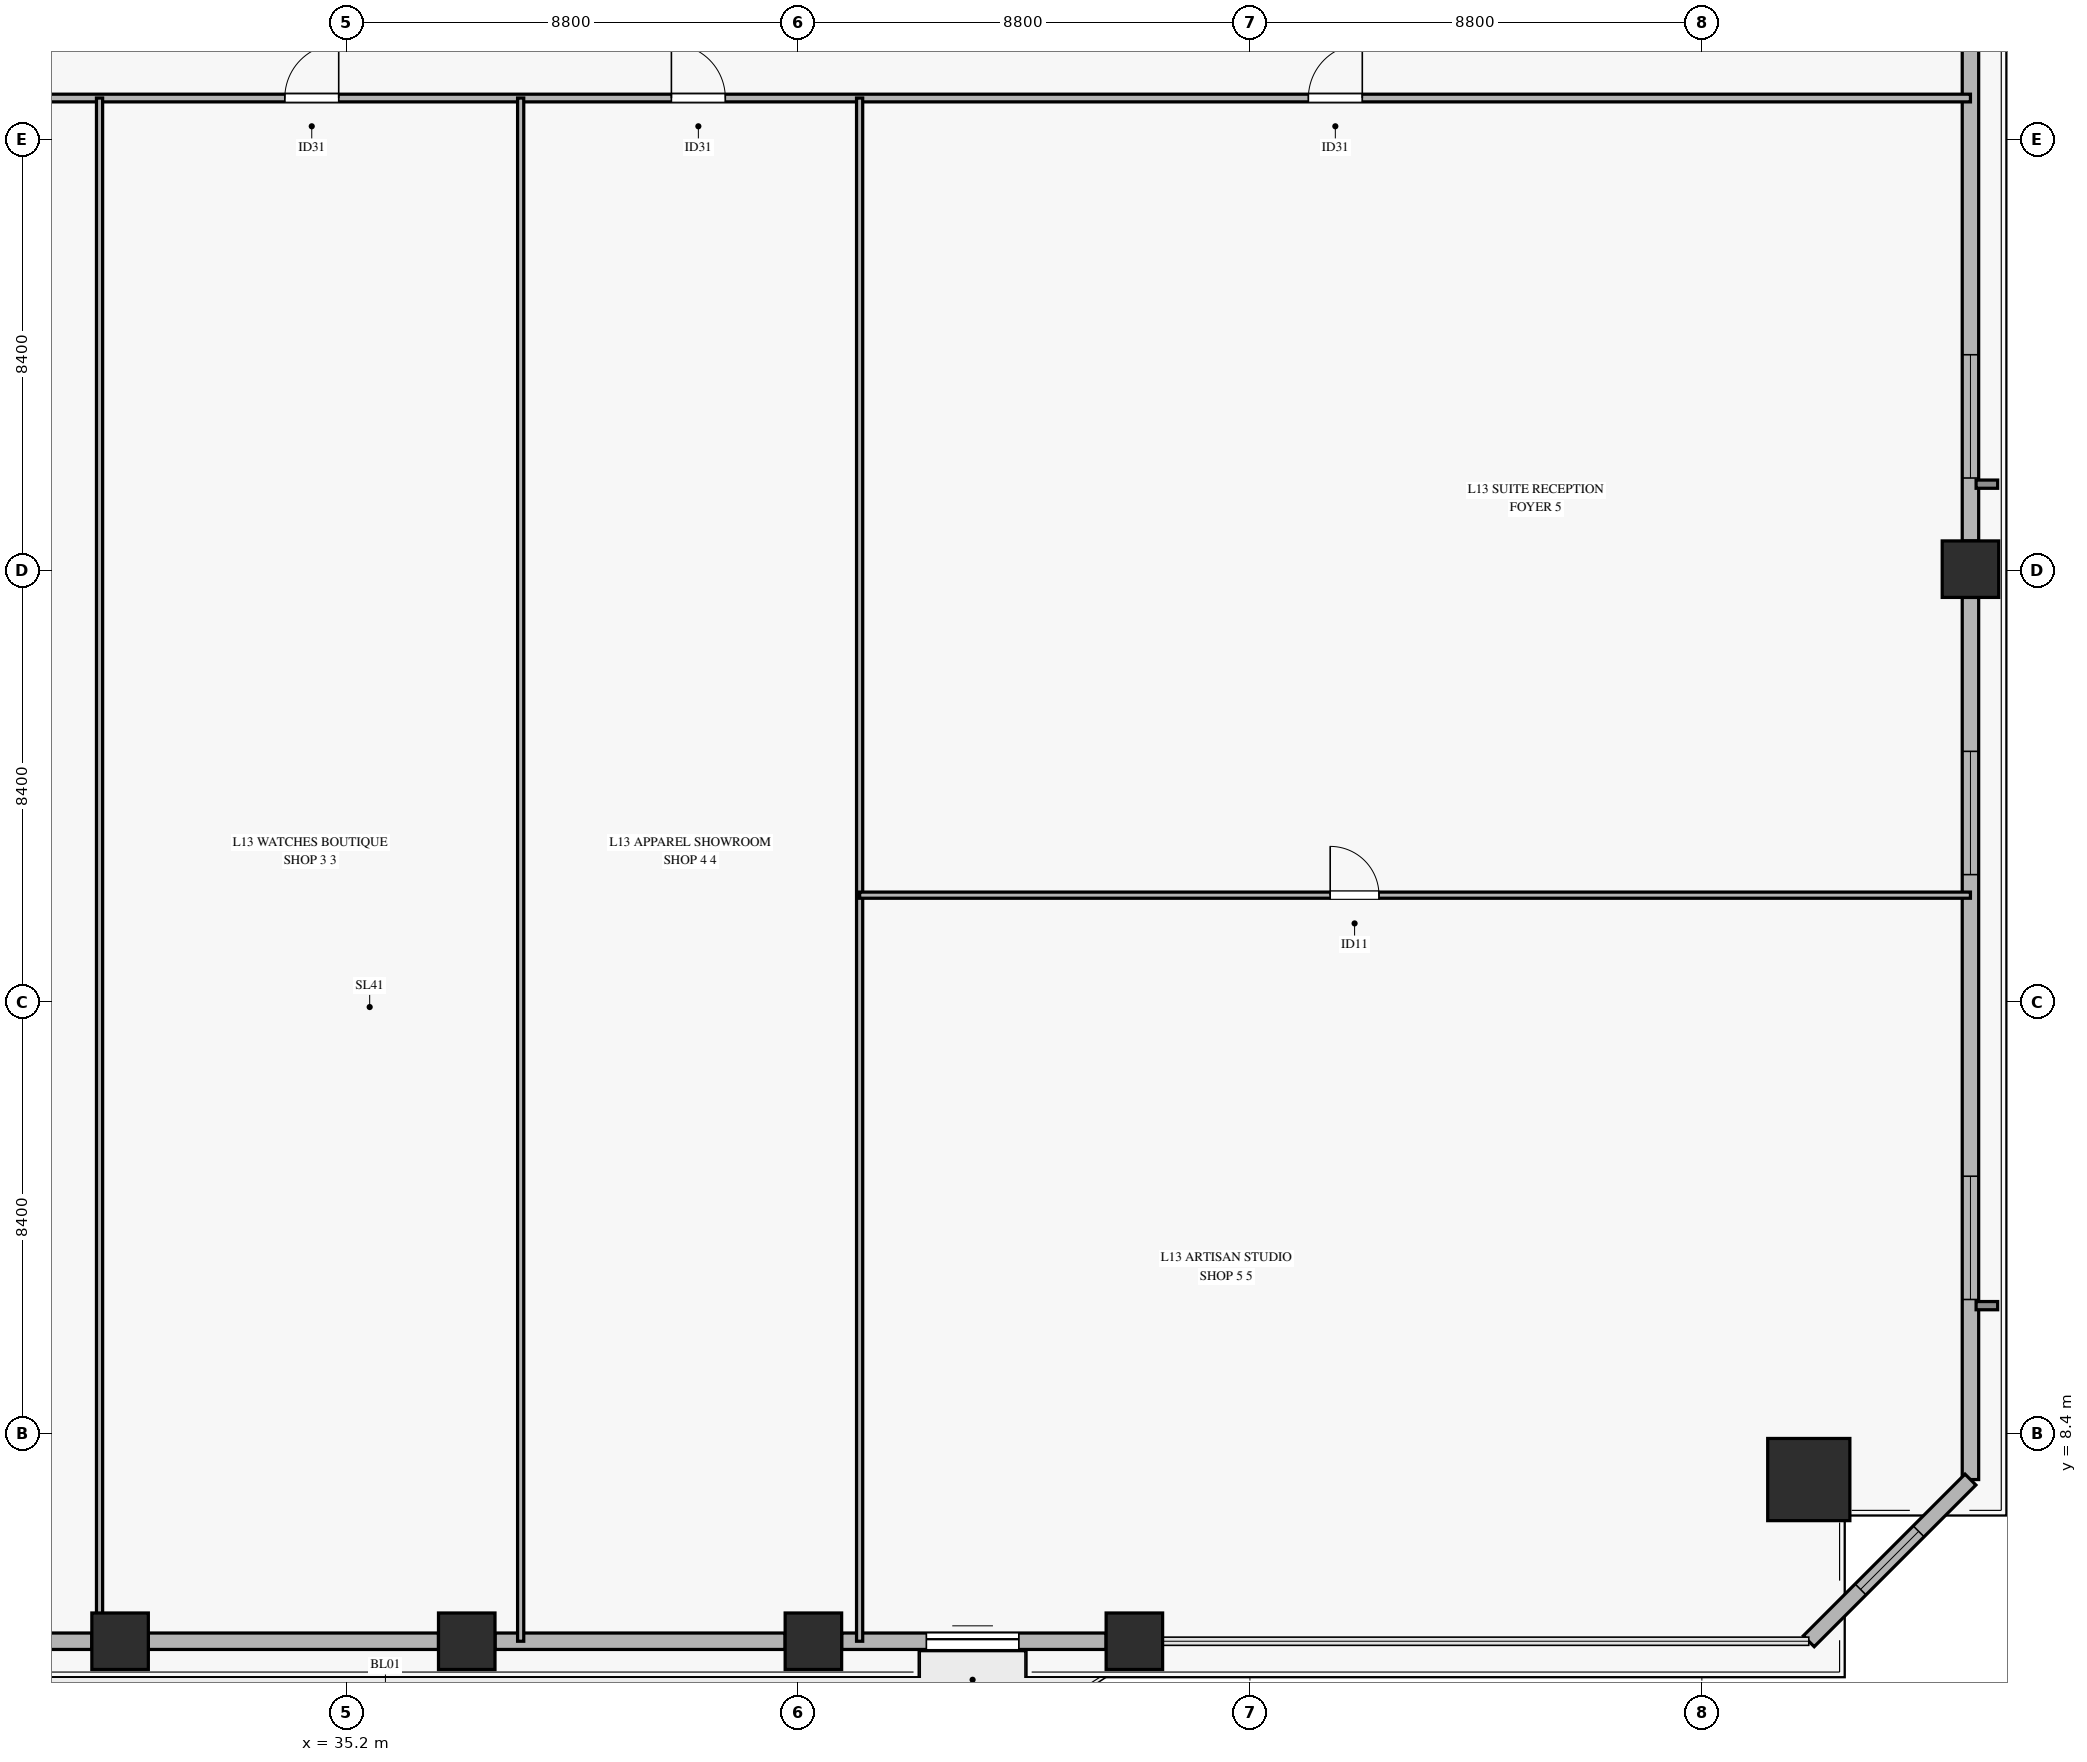
"""IFC4 building model, lengths in metres.
Left out: names, types, materials, properties, quantities, classifications, styles, units other than length and angle.
Written with IfcOpenShell. Run it as: python <this file> out.ifc"""

import sys

from ifc_helpers import new_model, si_unit, direction, frame, frame_2d, origin, origin_2d, place, context, subcontext, project, spatial, rectangle, hollow_rectangle, extrude, source, transform, mapped, element, fill, save


model = new_model("IFC4")
c1 = context("Model", 3, precision=1e-05, world=origin(), true_north=direction((0.0, 1.0)))
c2 = subcontext(c1, "Body", "Model", "MODEL_VIEW")
j1 = project(units=[si_unit("LENGTHUNIT", "METRE"), si_unit("PLANEANGLEUNIT", "RADIAN")], contexts=[c1])
p1 = place(None, origin())
s1 = spatial("IfcSite", under=j1, at=p1, CompositionType="ELEMENT")
p2 = place(p1, origin())
s2 = spatial("IfcBuilding", under=s1, at=p2, CompositionType="ELEMENT")
p3 = place(p2, frame((0.0, 0.0, 53.3)))
s3 = spatial("IfcBuildingStorey", under=s2, at=p3, CompositionType="ELEMENT", Elevation=53.3)
m1 = source(origin(), c2, "Body", "SweptSolid", [
    extrude(hollow_rectangle(XDim=1.6, YDim=1.6, WallThickness=0.075, at=origin_2d()), origin(), (0.0, 0.0, 1.0), 3.68),
])
p4 = place(p3, frame((63.682, 7.502, 0.0), z_axis=(0.0, 0.0, 1.0), x_axis=(1.0, 0.0, 0.0)))
e1 = element("IfcColumn", 1, at=p4, inside=s3, PredefinedType="COLUMN", context=c2, shape_type="MappedRepresentation", body=[
    mapped(m1, transform((0.0, 0.0, 0.0), x_axis=(1.0, 0.0, 0.0), y_axis=(0.0, 1.0, 0.0), z_axis=(0.0, 0.0, 1.0), scale=1.0)),
])
m2 = source(origin(), c2, "Body", "SweptSolid", [
    extrude(hollow_rectangle(XDim=1.1, YDim=1.1, WallThickness=0.05, at=origin_2d()), origin(), (0.0, 0.0, 1.0), 3.68),
])
for number, where, z_axis, x_axis in (
    (2, (30.8, 4.354, 0.0), (0.0, 0.0, 1.0), (1.0, 0.0, 0.0)),
    (3, (37.55, 4.354, 0.0), (0.0, 0.0, 1.0), (1.0, 0.0, 0.0)),
    (4, (44.3, 4.354, 0.0), (0.0, 0.0, 1.0), (1.0, 0.0, 0.0)),
    (5, (50.55, 4.354, 0.0), (0.0, 0.0, 1.0), (1.0, 0.0, 0.0)),
    (6, (66.83, 25.227, 0.0), (0.0, 0.0, 1.0), (1.0, 0.0, 0.0)),
):
    element("IfcColumn", number, at=place(p3, frame(where, z_axis=z_axis, x_axis=x_axis)), inside=s3, PredefinedType="COLUMN", context=c2, shape_type="MappedRepresentation", body=[
        mapped(m2, transform((0.0, 0.0, 0.0), x_axis=(1.0, 0.0, 0.0), y_axis=(0.0, 1.0, 0.0), z_axis=(0.0, 0.0, 1.0), scale=1.0)),
    ])
p5 = place(p3, frame((20.4, 4.354, 0.0), z_axis=(0.0, 0.0, 1.0), x_axis=(1.0, 0.0, 0.0)))
e7 = element("IfcWall", 7, at=p5, inside=s3, PredefinedType="SOLIDWALL", context=c2, shape_type="SweptSolid", body=[
    extrude(rectangle(XDim=9.85, YDim=0.32, at=frame_2d((4.925, 0.0))), origin(), (0.0, 0.0, 1.0), 3.16),
])
p6 = place(p5, frame((4.0, 0.0, 0.0)))
e8 = element("IfcOpeningElement", 8, at=p6, cuts=e7, PredefinedType="OPENING", context=c2, shape_type="SweptSolid", body=[
    extrude(rectangle(XDim=1.8, YDim=2.25, at=frame_2d((0.9, 1.125))), frame((0.0, 0.17, 0.0), z_axis=(0.0, -1.0, 0.0), x_axis=(1.0, 0.0, 0.0)), (0.0, 0.0, 1.0), 0.34),
])
p7 = place(p5, frame((2.045, 0.0, 0.45)))
e9 = element("IfcOpeningElement", 9, at=p7, cuts=e7, PredefinedType="OPENING", context=c2, shape_type="SweptSolid", body=[
    extrude(rectangle(XDim=1.6, YDim=2.0, at=frame_2d((0.8, 1.0))), frame((0.0, 0.17, 0.0), z_axis=(0.0, -1.0, 0.0), x_axis=(1.0, 0.0, 0.0)), (0.0, 0.0, 1.0), 0.34),
])
p8 = place(p5, frame((7.35, 0.0, 0.45)))
e10 = element("IfcOpeningElement", 10, at=p8, cuts=e7, PredefinedType="OPENING", context=c2, shape_type="SweptSolid", body=[
    extrude(rectangle(XDim=1.6, YDim=2.0, at=frame_2d((0.8, 1.0))), frame((0.0, 0.17, 0.0), z_axis=(0.0, -1.0, 0.0), x_axis=(1.0, 0.0, 0.0)), (0.0, 0.0, 1.0), 0.34),
])
for number, where, z_axis, x_axis in (
    (11, (31.35, 4.354, 0.0), (0.0, 0.0, 1.0), (1.0, 0.0, 0.0)),
    (12, (38.1, 4.354, 0.0), (0.0, 0.0, 1.0), (1.0, 0.0, 0.0)),
):
    element("IfcWall", number, at=place(p3, frame(where, z_axis=z_axis, x_axis=x_axis)), inside=s3, PredefinedType="SOLIDWALL", context=c2, shape_type="SweptSolid", body=[
        extrude(rectangle(XDim=5.65, YDim=0.32, at=frame_2d((2.825, 0.0))), origin(), (0.0, 0.0, 1.0), 3.16),
    ])
p9 = place(p3, frame((44.85, 4.354, 0.0), z_axis=(0.0, 0.0, 1.0), x_axis=(1.0, 0.0, 0.0)))
e13 = element("IfcWall", 13, at=p9, inside=s3, PredefinedType="SOLIDWALL", context=c2, shape_type="SweptSolid", body=[
    extrude(rectangle(XDim=5.15, YDim=0.32, at=frame_2d((2.575, 0.0))), origin(), (0.0, 0.0, 1.0), 3.16),
])
p10 = place(p9, frame((1.65, 0.0, 0.0)))
e14 = element("IfcOpeningElement", 14, at=p10, cuts=e13, PredefinedType="OPENING", context=c2, shape_type="SweptSolid", body=[
    extrude(rectangle(XDim=1.8, YDim=2.25, at=frame_2d((0.9, 1.125))), frame((0.0, 0.17, 0.0), z_axis=(0.0, -1.0, 0.0), x_axis=(1.0, 0.0, 0.0)), (0.0, 0.0, 1.0), 0.34),
])
p11 = place(p3, frame((66.83, 7.502, 0.0), z_axis=(0.0, 0.0, 1.0), x_axis=(0.0, 1.0, 0.0)))
e15 = element("IfcWall", 15, at=p11, inside=s3, PredefinedType="SOLIDWALL", context=c2, shape_type="SweptSolid", body=[
    extrude(rectangle(XDim=17.175, YDim=0.32, at=frame_2d((8.587, 0.0))), origin(), (0.0, 0.0, 1.0), 3.16),
])
p12 = place(p11, frame((3.506, 0.0, 0.45)))
e16 = element("IfcOpeningElement", 16, at=p12, cuts=e15, PredefinedType="OPENING", context=c2, shape_type="SweptSolid", body=[
    extrude(rectangle(XDim=2.4, YDim=2.1, at=frame_2d((1.2, 1.05))), frame((0.0, 0.17, 0.0), z_axis=(0.0, -1.0, 0.0), x_axis=(1.0, 0.0, 0.0)), (0.0, 0.0, 1.0), 0.34),
])
p13 = place(p11, frame((11.778, 0.0, 0.45)))
e17 = element("IfcOpeningElement", 17, at=p13, cuts=e15, PredefinedType="OPENING", context=c2, shape_type="SweptSolid", body=[
    extrude(rectangle(XDim=2.4, YDim=2.1, at=frame_2d((1.2, 1.05))), frame((0.0, 0.17, 0.0), z_axis=(0.0, -1.0, 0.0), x_axis=(1.0, 0.0, 0.0)), (0.0, 0.0, 1.0), 0.34),
])
p14 = place(p3, frame((66.83, 25.777, 0.0), z_axis=(0.0, 0.0, 1.0), x_axis=(0.0, 1.0, 0.0)))
e18 = element("IfcWall", 18, at=p14, inside=s3, PredefinedType="SOLIDWALL", context=c2, shape_type="SweptSolid", body=[
    extrude(rectangle(XDim=17.175, YDim=0.32, at=frame_2d((8.587, 0.0))), origin(), (0.0, 0.0, 1.0), 3.16),
])
p15 = place(p14, frame((1.225, 0.0, 0.45)))
e19 = element("IfcOpeningElement", 19, at=p15, cuts=e18, PredefinedType="OPENING", context=c2, shape_type="SweptSolid", body=[
    extrude(rectangle(XDim=2.4, YDim=2.1, at=frame_2d((1.2, 1.05))), frame((0.0, 0.17, 0.0), z_axis=(0.0, -1.0, 0.0), x_axis=(1.0, 0.0, 0.0)), (0.0, 0.0, 1.0), 0.34),
])
p16 = place(p14, frame((12.981, 0.0, 0.45)))
e20 = element("IfcOpeningElement", 20, at=p16, cuts=e18, PredefinedType="OPENING", context=c2, shape_type="SweptSolid", body=[
    extrude(rectangle(XDim=2.4, YDim=2.1, at=frame_2d((1.2, 1.05))), frame((0.0, 0.17, 0.0), z_axis=(0.0, -1.0, 0.0), x_axis=(1.0, 0.0, 0.0)), (0.0, 0.0, 1.0), 0.34),
])
p17 = place(p3, frame((63.682, 4.354, 0.0), z_axis=(0.0, 0.0, 1.0), x_axis=(0.707134199585, 0.707079361725, 0.0)))
e21 = element("IfcWall", 21, at=p17, inside=s3, PredefinedType="SOLIDWALL", context=c2, shape_type="SweptSolid", body=[
    extrude(rectangle(XDim=4.452, YDim=0.3, at=frame_2d((2.226, 0.0))), origin(), (0.0, 0.0, 1.0), 3.16),
])
p18 = place(p17, frame((1.426, 0.0, 0.45)))
e22 = element("IfcOpeningElement", 22, at=p18, cuts=e21, PredefinedType="OPENING", context=c2, shape_type="SweptSolid", body=[
    extrude(rectangle(XDim=1.6, YDim=2.0, at=frame_2d((0.8, 1.0))), frame((0.0, 0.16, 0.0), z_axis=(0.0, -1.0, 0.0), x_axis=(1.0, 0.0, 0.0)), (0.0, 0.0, 1.0), 0.32),
])
p19 = place(p3, frame((3.57, 34.4, 0.0), z_axis=(0.0, 0.0, 1.0), x_axis=(1.0, 0.0, 0.0)))
e23 = element("IfcWall", 23, at=p19, inside=s3, PredefinedType="PARTITIONING", context=c2, shape_type="SweptSolid", body=[
    extrude(rectangle(XDim=63.26, YDim=0.15, at=frame_2d((31.63, 0.0))), origin(), (0.0, 0.0, 1.0), 2.765),
])
p20 = place(p19, frame((7.658, 0.0, 0.0)))
e24 = element("IfcOpeningElement", 24, at=p20, cuts=e23, PredefinedType="OPENING", context=c2, shape_type="SweptSolid", body=[
    extrude(rectangle(XDim=1.05, YDim=2.15, at=frame_2d((0.525, 1.075))), frame((0.0, 0.085, 0.0), z_axis=(0.0, -1.0, 0.0), x_axis=(1.0, 0.0, 0.0)), (0.0, 0.0, 1.0), 0.17),
])
p21 = place(p19, frame((22.121, 0.0, 0.0)))
e25 = element("IfcOpeningElement", 25, at=p21, cuts=e23, PredefinedType="OPENING", context=c2, shape_type="SweptSolid", body=[
    extrude(rectangle(XDim=1.05, YDim=2.15, at=frame_2d((0.525, 1.075))), frame((0.0, 0.085, 0.0), z_axis=(0.0, -1.0, 0.0), x_axis=(1.0, 0.0, 0.0)), (0.0, 0.0, 1.0), 0.17),
])
p22 = place(p19, frame((30.437, 0.0, 0.0)))
e26 = element("IfcOpeningElement", 26, at=p22, cuts=e23, PredefinedType="OPENING", context=c2, shape_type="SweptSolid", body=[
    extrude(rectangle(XDim=1.05, YDim=2.15, at=frame_2d((0.525, 1.075))), frame((0.0, 0.085, 0.0), z_axis=(0.0, -1.0, 0.0), x_axis=(1.0, 0.0, 0.0)), (0.0, 0.0, 1.0), 0.17),
])
p23 = place(p19, frame((37.965, 0.0, 0.0)))
e27 = element("IfcOpeningElement", 27, at=p23, cuts=e23, PredefinedType="OPENING", context=c2, shape_type="SweptSolid", body=[
    extrude(rectangle(XDim=1.05, YDim=2.15, at=frame_2d((0.525, 1.075))), frame((0.0, 0.085, 0.0), z_axis=(0.0, -1.0, 0.0), x_axis=(1.0, 0.0, 0.0)), (0.0, 0.0, 1.0), 0.17),
])
p24 = place(p19, frame((50.368, 0.0, 0.0)))
e28 = element("IfcOpeningElement", 28, at=p24, cuts=e23, PredefinedType="OPENING", context=c2, shape_type="SweptSolid", body=[
    extrude(rectangle(XDim=1.05, YDim=2.15, at=frame_2d((0.525, 1.075))), frame((0.0, 0.085, 0.0), z_axis=(0.0, -1.0, 0.0), x_axis=(1.0, 0.0, 0.0)), (0.0, 0.0, 1.0), 0.17),
])
p25 = place(p3, frame((30.4, 4.354, 0.0), z_axis=(0.0, 0.0, 1.0), x_axis=(0.0, 1.0, 0.0)))
e29 = element("IfcWall", 29, at=p25, inside=s3, PredefinedType="PARTITIONING", context=c2, shape_type="SweptSolid", body=[
    extrude(rectangle(XDim=30.046, YDim=0.12, at=frame_2d((15.023, 0.0))), origin(), (0.0, 0.0, 1.0), 3.215),
])
for number, where, z_axis, x_axis in (
    (30, (38.6, 4.354, 0.0), (0.0, 0.0, 1.0), (0.0, 1.0, 0.0)),
    (31, (45.2, 4.354, 0.0), (0.0, 0.0, 1.0), (0.0, 1.0, 0.0)),
):
    element("IfcWall", number, at=place(p3, frame(where, z_axis=z_axis, x_axis=x_axis)), inside=s3, PredefinedType="PARTITIONING", context=c2, shape_type="SweptSolid", body=[
        extrude(rectangle(XDim=30.046, YDim=0.12, at=frame_2d((15.023, 0.0))), origin(), (0.0, 0.0, 1.0), 3.165),
    ])
p26 = place(p3, frame((45.2, 18.88, 0.0), z_axis=(0.0, 0.0, 1.0), x_axis=(1.0, 0.0, 0.0)))
e32 = element("IfcWall", 32, at=p26, inside=s3, PredefinedType="PARTITIONING", context=c2, shape_type="SweptSolid", body=[
    extrude(rectangle(XDim=21.63, YDim=0.12, at=frame_2d((10.815, 0.0))), origin(), (0.0, 0.0, 1.0), 2.765),
])
p27 = place(p26, frame((9.163, 0.0, 0.0)))
e33 = element("IfcOpeningElement", 33, at=p27, cuts=e32, PredefinedType="OPENING", context=c2, shape_type="SweptSolid", body=[
    extrude(rectangle(XDim=0.95, YDim=2.1, at=frame_2d((0.475, 1.05))), frame((0.0, 0.07, 0.0), z_axis=(0.0, -1.0, 0.0), x_axis=(1.0, 0.0, 0.0)), (0.0, 0.0, 1.0), 0.14),
])
m3 = source(origin(), c2, "Body", "SweptSolid", [
    extrude(rectangle(XDim=1.8, YDim=2.25, at=frame_2d((0.9, 1.125))), frame((0.0, 0.025, 0.0), z_axis=(0.0, -1.0, 0.0), x_axis=(1.0, 0.0, 0.0)), (0.0, 0.0, 1.0), 0.05),
])
p28 = place(p10, origin())
e34 = element("IfcDoor", 34, at=p28, inside=s3, OperationType="SLIDING_TO_LEFT", PredefinedType="DOOR", context=c2, shape_type="MappedRepresentation", body=[
    mapped(m3, transform((0.0, 0.0, 0.0), x_axis=(1.0, 0.0, 0.0), y_axis=(0.0, 1.0, 0.0), z_axis=(0.0, 0.0, 1.0), scale=1.0)),
])
fill(e14, e34)
m4 = source(origin(), c2, "Body", "SweptSolid", [
    extrude(rectangle(XDim=2.4, YDim=2.1, at=frame_2d((1.2, 1.05))), frame((0.0, 0.03, 0.0), z_axis=(0.0, -1.0, 0.0), x_axis=(1.0, 0.0, 0.0)), (0.0, 0.0, 1.0), 0.06),
])
p29 = place(p12, origin())
e35 = element("IfcWindow", 35, at=p29, inside=s3, PartitioningType="SINGLE_PANEL", PredefinedType="WINDOW", context=c2, shape_type="MappedRepresentation", body=[
    mapped(m4, transform((0.0, 0.0, 0.0), x_axis=(1.0, 0.0, 0.0), y_axis=(0.0, 1.0, 0.0), z_axis=(0.0, 0.0, 1.0), scale=1.0)),
])
fill(e16, e35)
p30 = place(p13, origin())
e36 = element("IfcWindow", 36, at=p30, inside=s3, PartitioningType="SINGLE_PANEL", PredefinedType="WINDOW", context=c2, shape_type="MappedRepresentation", body=[
    mapped(m4, transform((0.0, 0.0, 0.0), x_axis=(1.0, 0.0, 0.0), y_axis=(0.0, 1.0, 0.0), z_axis=(0.0, 0.0, 1.0), scale=1.0)),
])
fill(e17, e36)
p31 = place(p15, origin())
e37 = element("IfcWindow", 37, at=p31, inside=s3, PartitioningType="SINGLE_PANEL", PredefinedType="WINDOW", context=c2, shape_type="MappedRepresentation", body=[
    mapped(m4, transform((0.0, 0.0, 0.0), x_axis=(1.0, 0.0, 0.0), y_axis=(0.0, 1.0, 0.0), z_axis=(0.0, 0.0, 1.0), scale=1.0)),
])
fill(e19, e37)
m5 = source(origin(), c2, "Body", "SweptSolid", [
    extrude(rectangle(XDim=1.6, YDim=2.0, at=frame_2d((0.8, 1.0))), frame((0.0, 0.03, 0.0), z_axis=(0.0, -1.0, 0.0), x_axis=(1.0, 0.0, 0.0)), (0.0, 0.0, 1.0), 0.06),
])
p32 = place(p18, origin())
e38 = element("IfcWindow", 38, at=p32, inside=s3, PartitioningType="SINGLE_PANEL", PredefinedType="WINDOW", context=c2, shape_type="MappedRepresentation", body=[
    mapped(m5, transform((0.0, 0.0, 0.0), x_axis=(1.0, 0.0, 0.0), y_axis=(0.0, 1.0, 0.0), z_axis=(0.0, 0.0, 1.0), scale=1.0)),
])
fill(e22, e38)
m6 = source(origin(), c2, "Body", "SweptSolid", [
    extrude(rectangle(XDim=1.05, YDim=2.15, at=frame_2d((0.525, 1.075))), frame((0.0, 0.025, 0.0), z_axis=(0.0, -1.0, 0.0), x_axis=(1.0, 0.0, 0.0)), (0.0, 0.0, 1.0), 0.05),
])
p33 = place(p22, origin())
e39 = element("IfcDoor", 39, at=p33, inside=s3, OperationType="SINGLE_SWING_RIGHT", PredefinedType="DOOR", context=c2, shape_type="MappedRepresentation", body=[
    mapped(m6, transform((0.0, 0.0, 0.0), x_axis=(1.0, 0.0, 0.0), y_axis=(0.0, 1.0, 0.0), z_axis=(0.0, 0.0, 1.0), scale=1.0)),
])
fill(e26, e39)
p34 = place(p23, origin())
e40 = element("IfcDoor", 40, at=p34, inside=s3, OperationType="SINGLE_SWING_LEFT", PredefinedType="DOOR", context=c2, shape_type="MappedRepresentation", body=[
    mapped(m6, transform((0.0, 0.0, 0.0), x_axis=(1.0, 0.0, 0.0), y_axis=(0.0, 1.0, 0.0), z_axis=(0.0, 0.0, 1.0), scale=1.0)),
])
fill(e27, e40)
p35 = place(p24, origin())
e41 = element("IfcDoor", 41, at=p35, inside=s3, OperationType="SINGLE_SWING_RIGHT", PredefinedType="DOOR", context=c2, shape_type="MappedRepresentation", body=[
    mapped(m6, transform((0.0, 0.0, 0.0), x_axis=(1.0, 0.0, 0.0), y_axis=(0.0, 1.0, 0.0), z_axis=(0.0, 0.0, 1.0), scale=1.0)),
])
fill(e28, e41)
m7 = source(origin(), c2, "Body", "SweptSolid", [
    extrude(rectangle(XDim=0.95, YDim=2.1, at=frame_2d((0.475, 1.05))), frame((0.0, 0.025, 0.0), z_axis=(0.0, -1.0, 0.0), x_axis=(1.0, 0.0, 0.0)), (0.0, 0.0, 1.0), 0.05),
])
p36 = place(p27, origin())
e42 = element("IfcDoor", 42, at=p36, inside=s3, OperationType="SINGLE_SWING_LEFT", PredefinedType="DOOR", context=c2, shape_type="MappedRepresentation", body=[
    mapped(m7, transform((0.0, 0.0, 0.0), x_axis=(1.0, 0.0, 0.0), y_axis=(0.0, 1.0, 0.0), z_axis=(0.0, 0.0, 1.0), scale=1.0)),
])
fill(e33, e42)
save(model, sys.argv[1])
